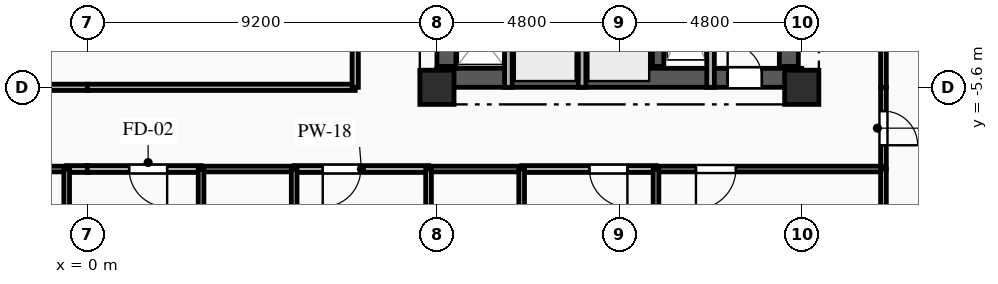
"""IFC4 building model, lengths in metres.
Left out: names, types, materials, properties, quantities, classifications, styles, units other than length and angle.
Written with IfcOpenShell. Run it as: python <this file> out.ifc"""

import sys

from ifc_helpers import new_model, si_unit, direction, frame, frame_2d, origin, origin_2d, place, context, subcontext, project, spatial, rectangle, extrude, element, fill, save


model = new_model("IFC4")
c1 = context("Model", 3, precision=1e-05, world=origin(), true_north=direction((0.0, 1.0)))
c2 = subcontext(c1, "Body", "Model", "MODEL_VIEW")
j1 = project(units=[si_unit("LENGTHUNIT", "METRE"), si_unit("PLANEANGLEUNIT", "RADIAN")], contexts=[c1])
p1 = place(None, origin())
s1 = spatial("IfcSite", under=j1, at=p1, CompositionType="ELEMENT")
p2 = place(p1, origin())
s2 = spatial("IfcBuilding", under=s1, at=p2, CompositionType="ELEMENT")
p3 = place(p2, frame((0.0, 0.0, 154.45)))
s3 = spatial("IfcBuildingStorey", under=s2, at=p3, CompositionType="ELEMENT", Elevation=154.45)
for number, where, z_axis, x_axis in (
    (1, (9.2, -5.6, 0.0), (0.0, 0.0, 1.0), (1.0, 0.0, 0.0)),
    (2, (18.8, -5.6, 0.0), (0.0, 0.0, 1.0), (1.0, 0.0, 0.0)),
):
    element("IfcColumn", number, at=place(p3, frame(where, z_axis=z_axis, x_axis=x_axis)), inside=s3, PredefinedType="COLUMN", context=c2, shape_type="SweptSolid", body=[
        extrude(rectangle(XDim=0.9, YDim=0.9, at=origin_2d()), origin(), (0.0, 0.0, 1.0), 3.35),
    ])
p4 = place(p3, frame((9.2, -5.35, 0.0), z_axis=(0.0, 0.0, 1.0), x_axis=(1.0, 0.0, 0.0)))
e3 = element("IfcWall", 3, at=p4, inside=s3, PredefinedType="SHEAR", context=c2, shape_type="SweptSolid", body=[
    extrude(rectangle(XDim=9.6, YDim=0.5, at=frame_2d((4.8, 0.0))), origin(), (0.0, 0.0, 1.0), 3.04),
])
p5 = place(p4, frame((7.65, 0.0, 0.0)))
e4 = element("IfcOpeningElement", 4, at=p5, cuts=e3, PredefinedType="OPENING", context=c2, shape_type="SweptSolid", body=[
    extrude(rectangle(XDim=0.9, YDim=2.1, at=frame_2d((0.45, 1.05))), frame((0.0, 0.26, 0.0), z_axis=(0.0, -1.0, 0.0), x_axis=(1.0, 0.0, 0.0)), (0.0, 0.0, 1.0), 0.52),
])
p6 = place(p3, frame((9.45, -5.05, 0.0), z_axis=(0.0, 0.0, 1.0), x_axis=(0.0, 1.0, 0.0)))
e5 = element("IfcWall", 5, at=p6, inside=s3, PredefinedType="SHEAR", context=c2, shape_type="SweptSolid", body=[
    extrude(rectangle(XDim=10.1, YDim=0.5, at=frame_2d((5.05, 0.0))), origin(), (0.0, 0.0, 1.0), 3.04),
])
p7 = place(p6, frame((7.15, 0.0, 0.0)))
e6 = element("IfcOpeningElement", 6, at=p7, cuts=e5, PredefinedType="OPENING", context=c2, shape_type="SweptSolid", body=[
    extrude(rectangle(XDim=0.9, YDim=2.1, at=frame_2d((0.45, 1.05))), frame((0.0, 0.26, 0.0), z_axis=(0.0, -1.0, 0.0), x_axis=(1.0, 0.0, 0.0)), (0.0, 0.0, 1.0), 0.52),
])
p8 = place(p6, frame((2.4, 0.0, 0.0)))
e7 = element("IfcOpeningElement", 7, at=p8, cuts=e5, PredefinedType="OPENING", context=c2, shape_type="SweptSolid", body=[
    extrude(rectangle(XDim=1.2, YDim=2.15, at=frame_2d((0.6, 1.075))), frame((0.0, 0.26, 0.0), z_axis=(0.0, -1.0, 0.0), x_axis=(1.0, 0.0, 0.0)), (0.0, 0.0, 1.0), 0.52),
])
p9 = place(p3, frame((18.46, -5.05, 0.0), z_axis=(0.0, 0.0, 1.0), x_axis=(0.0, 1.0, 0.0)))
e8 = element("IfcWall", 8, at=p9, inside=s3, PredefinedType="SHEAR", context=c2, shape_type="SweptSolid", body=[
    extrude(rectangle(XDim=10.1, YDim=0.5, at=frame_2d((5.05, 0.0))), origin(), (0.0, 0.0, 1.0), 3.04),
])
p10 = place(p3, frame((15.02, -5.05, 0.0), z_axis=(0.0, 0.0, 1.0), x_axis=(0.0, 1.0, 0.0)))
e9 = element("IfcWall", 9, at=p10, inside=s3, PredefinedType="SHEAR", context=c2, shape_type="SweptSolid", body=[
    extrude(rectangle(XDim=10.1, YDim=0.3, at=frame_2d((5.05, 0.0))), origin(), (0.0, 0.0, 1.0), 3.04),
])
p11 = place(p3, frame((16.4, -2.11, 0.0), z_axis=(0.0, 0.0, 1.0), x_axis=(0.0, -1.0, 0.0)))
e10 = element("IfcWall", 10, at=p11, inside=s3, PredefinedType="PARTITIONING", context=c2, shape_type="SweptSolid", body=[
    extrude(rectangle(XDim=3.49, YDim=0.2, at=frame_2d((1.745, 0.0))), origin(), (0.0, 0.0, 1.0), 3.04),
])
for number, where, z_axis, x_axis in (
    (11, (11.08, -5.6, 0.0), (0.0, 0.0, 1.0), (0.0, 1.0, 0.0)),
    (12, (13.02, -5.6, 0.0), (0.0, 0.0, 1.0), (0.0, 1.0, 0.0)),
):
    element("IfcWall", number, at=place(p3, frame(where, z_axis=z_axis, x_axis=x_axis)), inside=s3, PredefinedType="PARTITIONING", context=c2, shape_type="SweptSolid", body=[
        extrude(rectangle(XDim=2.25, YDim=0.2, at=frame_2d((1.125, 0.0))), origin(), (0.0, 0.0, 1.0), 3.04),
    ])
p12 = place(p3, frame((0.0, -7.75, 0.0), z_axis=(0.0, 0.0, 1.0), x_axis=(-1.0, 0.0, 0.0)))
e13 = element("IfcWall", 13, at=p12, inside=s3, PredefinedType="PARTITIONING", context=c2, shape_type="SweptSolid", body=[
    extrude(rectangle(XDim=0.543, YDim=0.18, at=frame_2d((0.271, 0.0))), origin(), (0.0, 0.0, 1.0), 3.04),
])
p13 = place(p3, frame((-0.543, -7.75, 0.0), z_axis=(0.0, 0.0, 1.0), x_axis=(-1.0, 0.0, 0.0)))
e14 = element("IfcWall", 14, at=p13, inside=s3, PredefinedType="PLUMBINGWALL", context=c2, shape_type="SweptSolid", body=[
    extrude(rectangle(XDim=2.45, YDim=0.15, at=frame_2d((1.225, 0.0))), origin(), (0.0, 0.0, 1.0), 3.04),
])
p14 = place(p3, frame((-7.05, -5.6, 0.0), z_axis=(0.0, 0.0, 1.0), x_axis=(1.0, 0.0, 0.0)))
e15 = element("IfcWall", 15, at=p14, inside=s3, PredefinedType="PARTITIONING", context=c2, shape_type="SweptSolid", body=[
    extrude(rectangle(XDim=7.05, YDim=0.165, at=frame_2d((3.525, 0.0))), origin(), (0.0, 0.0, 1.0), 2.525),
])
p15 = place(p3, frame((20.95, -5.6, 0.0), z_axis=(0.0, 0.0, 1.0), x_axis=(0.0, -1.0, 0.0)))
e16 = element("IfcWall", 16, at=p15, inside=s3, PredefinedType="PARTITIONING", context=c2, shape_type="SweptSolid", body=[
    extrude(rectangle(XDim=2.15, YDim=0.15, at=frame_2d((1.075, 0.0))), origin(), (0.0, 0.0, 1.0), 3.04),
])
p16 = place(p15, frame((0.625, 0.0, 0.0)))
e17 = element("IfcOpeningElement", 17, at=p16, cuts=e16, PredefinedType="OPENING", context=c2, shape_type="SweptSolid", body=[
    extrude(rectangle(XDim=0.9, YDim=2.1, at=frame_2d((0.45, 1.05))), frame((0.0, 0.085, 0.0), z_axis=(0.0, -1.0, 0.0), x_axis=(1.0, 0.0, 0.0)), (0.0, 0.0, 1.0), 0.17),
])
p17 = place(p3, frame((2.993, -7.75, 0.0), z_axis=(0.0, 0.0, 1.0), x_axis=(-1.0, 0.0, 0.0)))
e18 = element("IfcWall", 18, at=p17, inside=s3, PredefinedType="PARTITIONING", context=c2, shape_type="SweptSolid", body=[
    extrude(rectangle(XDim=2.993, YDim=0.18, at=frame_2d((1.497, 0.0))), origin(), (0.0, 0.0, 1.0), 3.04),
])
p18 = place(p17, frame((0.892, 0.0, 0.0)))
e19 = element("IfcOpeningElement", 19, at=p18, cuts=e18, PredefinedType="OPENING", context=c2, shape_type="SweptSolid", body=[
    extrude(rectangle(XDim=1.0, YDim=2.15, at=frame_2d((0.5, 1.075))), frame((0.0, 0.1, 0.0), z_axis=(0.0, -1.0, 0.0), x_axis=(1.0, 0.0, 0.0)), (0.0, 0.0, 1.0), 0.2),
])
p19 = place(p3, frame((8.979, -7.75, 0.0), z_axis=(0.0, 0.0, 1.0), x_axis=(-1.0, 0.0, 0.0)))
e20 = element("IfcWall", 20, at=p19, inside=s3, PredefinedType="PARTITIONING", context=c2, shape_type="SweptSolid", body=[
    extrude(rectangle(XDim=3.536, YDim=0.18, at=frame_2d((1.768, 0.0))), origin(), (0.0, 0.0, 1.0), 3.04),
])
p20 = place(p19, frame((1.784, 0.0, 0.0)))
e21 = element("IfcOpeningElement", 21, at=p20, cuts=e20, PredefinedType="OPENING", context=c2, shape_type="SweptSolid", body=[
    extrude(rectangle(XDim=1.0, YDim=2.15, at=frame_2d((0.5, 1.075))), frame((0.0, 0.1, 0.0), z_axis=(0.0, -1.0, 0.0), x_axis=(1.0, 0.0, 0.0)), (0.0, 0.0, 1.0), 0.2),
])
p21 = place(p3, frame((5.443, -7.75, 0.0), z_axis=(0.0, 0.0, 1.0), x_axis=(-1.0, 0.0, 0.0)))
e22 = element("IfcWall", 22, at=p21, inside=s3, PredefinedType="PLUMBINGWALL", context=c2, shape_type="SweptSolid", body=[
    extrude(rectangle(XDim=2.45, YDim=0.15, at=frame_2d((1.225, 0.0))), origin(), (0.0, 0.0, 1.0), 3.04),
])
p22 = place(p3, frame((14.964, -7.75, 0.0), z_axis=(0.0, 0.0, 1.0), x_axis=(-1.0, 0.0, 0.0)))
e23 = element("IfcWall", 23, at=p22, inside=s3, PredefinedType="PARTITIONING", context=c2, shape_type="SweptSolid", body=[
    extrude(rectangle(XDim=3.535, YDim=0.18, at=frame_2d((1.768, 0.0))), origin(), (0.0, 0.0, 1.0), 3.04),
])
p23 = place(p22, frame((0.752, 0.0, 0.0)))
e24 = element("IfcOpeningElement", 24, at=p23, cuts=e23, PredefinedType="OPENING", context=c2, shape_type="SweptSolid", body=[
    extrude(rectangle(XDim=1.0, YDim=2.15, at=frame_2d((0.5, 1.075))), frame((0.0, 0.1, 0.0), z_axis=(0.0, -1.0, 0.0), x_axis=(1.0, 0.0, 0.0)), (0.0, 0.0, 1.0), 0.2),
])
p24 = place(p3, frame((11.429, -7.75, 0.0), z_axis=(0.0, 0.0, 1.0), x_axis=(-1.0, 0.0, 0.0)))
e25 = element("IfcWall", 25, at=p24, inside=s3, PredefinedType="PLUMBINGWALL", context=c2, shape_type="SweptSolid", body=[
    extrude(rectangle(XDim=2.45, YDim=0.15, at=frame_2d((1.225, 0.0))), origin(), (0.0, 0.0, 1.0), 3.04),
])
p25 = place(p3, frame((20.95, -7.75, 0.0), z_axis=(0.0, 0.0, 1.0), x_axis=(-1.0, 0.0, 0.0)))
e26 = element("IfcWall", 26, at=p25, inside=s3, PredefinedType="PARTITIONING", context=c2, shape_type="SweptSolid", body=[
    extrude(rectangle(XDim=5.986, YDim=0.15, at=frame_2d((2.993, 0.0))), origin(), (0.0, 0.0, 1.0), 3.04),
])
p26 = place(p25, frame((3.884, 0.0, 0.0)))
e27 = element("IfcOpeningElement", 27, at=p26, cuts=e26, PredefinedType="OPENING", context=c2, shape_type="SweptSolid", body=[
    extrude(rectangle(XDim=1.05, YDim=2.15, at=frame_2d((0.525, 1.075))), frame((0.0, 0.085, 0.0), z_axis=(0.0, -1.0, 0.0), x_axis=(1.0, 0.0, 0.0)), (0.0, 0.0, 1.0), 0.17),
])
p27 = place(p3, frame((0.0, -5.6, 0.0), z_axis=(0.0, 0.0, 1.0), x_axis=(1.0, 0.0, 0.0)))
e28 = element("IfcWall", 28, at=p27, inside=s3, PredefinedType="PARTITIONING", context=c2, shape_type="SweptSolid", body=[
    extrude(rectangle(XDim=7.05, YDim=0.165, at=frame_2d((3.525, 0.0))), origin(), (0.0, 0.0, 1.0), 2.525),
])
p28 = place(p3, frame((20.95, -3.46, 0.0), z_axis=(0.0, 0.0, 1.0), x_axis=(0.0, -1.0, 0.0)))
e29 = element("IfcWall", 29, at=p28, inside=s3, PredefinedType="PARTITIONING", context=c2, shape_type="SweptSolid", body=[
    extrude(rectangle(XDim=2.14, YDim=0.15, at=frame_2d((1.07, 0.0))), origin(), (0.0, 0.0, 1.0), 3.04),
])
p29 = place(p3, frame((7.05, -5.6, 0.0), z_axis=(0.0, 0.0, 1.0), x_axis=(0.0, 1.0, 0.0)))
e30 = element("IfcWall", 30, at=p29, inside=s3, PredefinedType="PARTITIONING", context=c2, shape_type="SweptSolid", body=[
    extrude(rectangle(XDim=2.65, YDim=0.165, at=frame_2d((1.325, 0.0))), origin(), (0.0, 0.0, 1.0), 3.04),
])
p30 = place(p3, frame((20.95, -15.6, 0.0), z_axis=(0.0, 0.0, 1.0), x_axis=(0.0, 1.0, 0.0)))
e31 = element("IfcWall", 31, at=p30, inside=s3, PredefinedType="PARTITIONING", context=c2, shape_type="SweptSolid", body=[
    extrude(rectangle(XDim=7.85, YDim=0.15, at=frame_2d((3.925, 0.0))), origin(), (0.0, 0.0, 1.0), 3.04),
])
for number, where, z_axis, x_axis in (
    (32, (-0.543, -9.9, 0.0), (0.0, 0.0, 1.0), (0.0, 1.0, 0.0)),
    (33, (2.993, -7.75, 0.0), (0.0, 0.0, 1.0), (0.0, -1.0, 0.0)),
    (34, (5.443, -9.9, 0.0), (0.0, 0.0, 1.0), (0.0, 1.0, 0.0)),
    (35, (8.979, -7.75, 0.0), (0.0, 0.0, 1.0), (0.0, -1.0, 0.0)),
    (36, (11.429, -9.9, 0.0), (0.0, 0.0, 1.0), (0.0, 1.0, 0.0)),
):
    element("IfcWall", number, at=place(p3, frame(where, z_axis=z_axis, x_axis=x_axis)), inside=s3, PredefinedType="PLUMBINGWALL", context=c2, shape_type="SweptSolid", body=[
        extrude(rectangle(XDim=2.15, YDim=0.15, at=frame_2d((1.075, 0.0))), origin(), (0.0, 0.0, 1.0), 3.04),
    ])
p31 = place(p3, frame((14.964, -7.75, 0.0), z_axis=(0.0, 0.0, 1.0), x_axis=(0.0, -1.0, 0.0)))
e37 = element("IfcWall", 37, at=p31, inside=s3, PredefinedType="PARTITIONING", context=c2, shape_type="SweptSolid", body=[
    extrude(rectangle(XDim=7.85, YDim=0.15, at=frame_2d((3.925, 0.0))), origin(), (0.0, 0.0, 1.0), 3.04),
])
p32 = place(p5, origin())
e38 = element("IfcDoor", 38, at=p32, inside=s3, OperationType="SINGLE_SWING_LEFT", PredefinedType="DOOR", context=c2, shape_type="SweptSolid", body=[
    extrude(rectangle(XDim=0.9, YDim=2.1, at=frame_2d((0.45, 1.05))), frame((0.0, 0.025, 0.0), z_axis=(0.0, -1.0, 0.0), x_axis=(1.0, 0.0, 0.0)), (0.0, 0.0, 1.0), 0.05),
])
fill(e4, e38)
p33 = place(p16, origin())
e39 = element("IfcDoor", 39, at=p33, inside=s3, OperationType="SINGLE_SWING_RIGHT", PredefinedType="DOOR", context=c2, shape_type="SweptSolid", body=[
    extrude(rectangle(XDim=0.9, YDim=2.1, at=frame_2d((0.45, 1.05))), frame((0.0, 0.025, 0.0), z_axis=(0.0, -1.0, 0.0), x_axis=(1.0, 0.0, 0.0)), (0.0, 0.0, 1.0), 0.05),
])
fill(e17, e39)
p34 = place(p18, origin())
e40 = element("IfcDoor", 40, at=p34, inside=s3, OperationType="SINGLE_SWING_LEFT", PredefinedType="DOOR", context=c2, shape_type="SweptSolid", body=[
    extrude(rectangle(XDim=1.0, YDim=2.15, at=frame_2d((0.5, 1.075))), frame((0.0, 0.025, 0.0), z_axis=(0.0, -1.0, 0.0), x_axis=(1.0, 0.0, 0.0)), (0.0, 0.0, 1.0), 0.05),
])
fill(e19, e40)
p35 = place(p20, origin())
e41 = element("IfcDoor", 41, at=p35, inside=s3, OperationType="SINGLE_SWING_RIGHT", PredefinedType="DOOR", context=c2, shape_type="SweptSolid", body=[
    extrude(rectangle(XDim=1.0, YDim=2.15, at=frame_2d((0.5, 1.075))), frame((0.0, 0.025, 0.0), z_axis=(0.0, -1.0, 0.0), x_axis=(1.0, 0.0, 0.0)), (0.0, 0.0, 1.0), 0.05),
])
fill(e21, e41)
p36 = place(p23, origin())
e42 = element("IfcDoor", 42, at=p36, inside=s3, OperationType="SINGLE_SWING_LEFT", PredefinedType="DOOR", context=c2, shape_type="SweptSolid", body=[
    extrude(rectangle(XDim=1.0, YDim=2.15, at=frame_2d((0.5, 1.075))), frame((0.0, 0.025, 0.0), z_axis=(0.0, -1.0, 0.0), x_axis=(1.0, 0.0, 0.0)), (0.0, 0.0, 1.0), 0.05),
])
fill(e24, e42)
p37 = place(p26, origin())
e43 = element("IfcDoor", 43, at=p37, inside=s3, OperationType="SINGLE_SWING_RIGHT", PredefinedType="DOOR", context=c2, shape_type="SweptSolid", body=[
    extrude(rectangle(XDim=1.05, YDim=2.15, at=frame_2d((0.525, 1.075))), frame((0.0, 0.025, 0.0), z_axis=(0.0, -1.0, 0.0), x_axis=(1.0, 0.0, 0.0)), (0.0, 0.0, 1.0), 0.05),
])
fill(e27, e43)
save(model, sys.argv[1])
